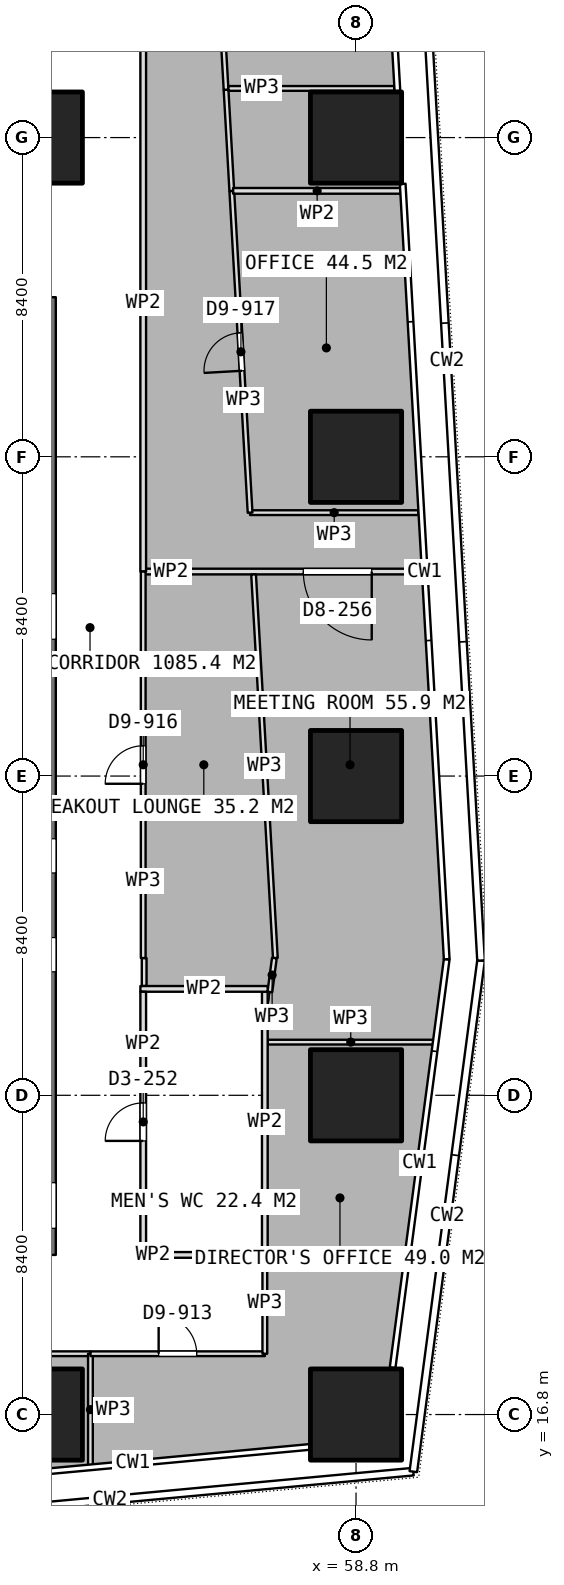
"""IFC4 building model, lengths in metres.
Left out: names, types, materials, properties, quantities, classifications, styles, units other than length and angle.
Written with IfcOpenShell. Run it as: python <this file> out.ifc"""

import sys

from ifc_helpers import new_model, si_unit, direction, frame, frame_2d, origin, origin_2d, place, context, subcontext, project, spatial, rectangle, extrude, element, fill, save


model = new_model("IFC4")
c1 = context("Model", 3, precision=1e-05, world=origin(), true_north=direction((0.0, 1.0)))
c2 = subcontext(c1, "Body", "Model", "MODEL_VIEW")
j1 = project(units=[si_unit("LENGTHUNIT", "METRE"), si_unit("PLANEANGLEUNIT", "RADIAN")], contexts=[c1])
p1 = place(None, origin())
s1 = spatial("IfcSite", under=j1, at=p1, CompositionType="ELEMENT")
p2 = place(p1, origin())
s2 = spatial("IfcBuilding", under=s1, at=p2, CompositionType="ELEMENT")
p3 = place(p2, frame((0.0, 0.0, 232.7)))
s3 = spatial("IfcBuildingStorey", under=s2, at=p3, CompositionType="ELEMENT", Elevation=232.7)
p4 = place(p3, frame((50.4, 21.0, 0.0), z_axis=(0.0, 0.0, 1.0), x_axis=(0.0, 1.0, 0.0)))
e1 = element("IfcWall", 1, at=p4, inside=s3, PredefinedType="SHEAR", context=c2, shape_type="SweptSolid", body=[
    extrude(rectangle(XDim=25.2, YDim=1.0, at=frame_2d((12.6, 0.0))), origin(), (0.0, 0.0, 1.0), 3.75),
])
p5 = place(p4, frame((16.2, 0.0, 0.0)))
e2 = element("IfcOpeningElement", 2, at=p5, cuts=e1, PredefinedType="OPENING", context=c2, shape_type="SweptSolid", body=[
    extrude(rectangle(XDim=1.2, YDim=2.1, at=frame_2d((0.6, 1.05))), frame((0.0, 0.51, 0.0), z_axis=(0.0, -1.0, 0.0), x_axis=(1.0, 0.0, 0.0)), (0.0, 0.0, 1.0), 1.02),
])
p6 = place(p4, frame((10.05, 0.0, 0.0)))
e3 = element("IfcOpeningElement", 3, at=p6, cuts=e1, PredefinedType="OPENING", context=c2, shape_type="SweptSolid", body=[
    extrude(rectangle(XDim=0.9, YDim=2.1, at=frame_2d((0.45, 1.05))), frame((0.0, 0.51, 0.0), z_axis=(0.0, -1.0, 0.0), x_axis=(1.0, 0.0, 0.0)), (0.0, 0.0, 1.0), 1.02),
])
p7 = place(p4, frame((7.45, 0.0, 0.0)))
e4 = element("IfcOpeningElement", 4, at=p7, cuts=e1, PredefinedType="OPENING", context=c2, shape_type="SweptSolid", body=[
    extrude(rectangle(XDim=0.9, YDim=2.1, at=frame_2d((0.45, 1.05))), frame((0.0, 0.51, 0.0), z_axis=(0.0, -1.0, 0.0), x_axis=(1.0, 0.0, 0.0)), (0.0, 0.0, 1.0), 1.02),
])
p8 = place(p4, frame((0.7, 0.0, 0.0)))
e5 = element("IfcOpeningElement", 5, at=p8, cuts=e1, PredefinedType="OPENING", context=c2, shape_type="SweptSolid", body=[
    extrude(rectangle(XDim=1.2, YDim=2.1, at=frame_2d((0.6, 1.05))), frame((0.0, 0.51, 0.0), z_axis=(0.0, -1.0, 0.0), x_axis=(1.0, 0.0, 0.0)), (0.0, 0.0, 1.0), 1.02),
])
for number, where, z_axis, x_axis in (
    (6, (50.4, 16.8, 0.0), (0.0, 0.0, 1.0), (1.0, 0.0, 0.0)),
    (7, (50.4, 50.4, 0.0), (0.0, 0.0, 1.0), (1.0, 0.0, 0.0)),
    (8, (58.8, 16.8, 0.0), (0.0, 0.0, 1.0), (1.0, 0.0, 0.0)),
    (9, (58.8, 25.2, 0.0), (0.0, 0.0, 1.0), (1.0, 0.0, 0.0)),
    (10, (58.8, 33.6, 0.0), (0.0, 0.0, 1.0), (1.0, 0.0, 0.0)),
    (11, (58.8, 42.0, 0.0), (0.0, 0.0, 1.0), (1.0, 0.0, 0.0)),
    (12, (58.8, 50.4, 0.0), (0.0, 0.0, 1.0), (1.0, 0.0, 0.0)),
):
    element("IfcColumn", number, at=place(p3, frame(where, z_axis=z_axis, x_axis=x_axis)), inside=s3, PredefinedType="COLUMN", context=c2, shape_type="SweptSolid", body=[
        extrude(rectangle(XDim=2.4, YDim=2.4, at=origin_2d()), origin(), (0.0, 0.0, 1.0), 3.75),
    ])
for number, where, z_axis, x_axis in (
    (13, (53.125, 21.0, 0.0), (0.0, 0.0, 1.0), (1.0, 0.0, 0.0)),
    (14, (53.125, 28.0, 0.0), (0.0, 0.0, 1.0), (1.0, 0.0, 0.0)),
):
    element("IfcWall", number, at=place(p3, frame(where, z_axis=z_axis, x_axis=x_axis)), inside=s3, PredefinedType="PARTITIONING", context=c2, shape_type="SweptSolid", body=[
        extrude(rectangle(XDim=3.35, YDim=0.15, at=frame_2d((1.675, 0.0))), origin(), (0.0, 0.0, 1.0), 3.5),
    ])
p9 = place(p3, frame((53.2, 21.075, 0.0), z_axis=(0.0, 0.0, 1.0), x_axis=(0.0, 1.0, 0.0)))
e15 = element("IfcWall", 15, at=p9, inside=s3, PredefinedType="PARTITIONING", context=c2, shape_type="SweptSolid", body=[
    extrude(rectangle(XDim=6.85, YDim=0.15, at=frame_2d((3.425, 0.0))), origin(), (0.0, 0.0, 1.0), 3.5),
])
p10 = place(p9, frame((2.925, 0.0, 0.0)))
e16 = element("IfcOpeningElement", 16, at=p10, cuts=e15, PredefinedType="OPENING", context=c2, shape_type="SweptSolid", body=[
    extrude(rectangle(XDim=1.0, YDim=2.1, at=frame_2d((0.5, 1.05))), frame((0.0, 0.085, 0.0), z_axis=(0.0, -1.0, 0.0), x_axis=(1.0, 0.0, 0.0)), (0.0, 0.0, 1.0), 0.17),
])
p11 = place(p3, frame((56.4, 21.075, 0.0), z_axis=(0.0, 0.0, 1.0), x_axis=(0.0, 1.0, 0.0)))
e17 = element("IfcWall", 17, at=p11, inside=s3, PredefinedType="PARTITIONING", context=c2, shape_type="SweptSolid", body=[
    extrude(rectangle(XDim=6.85, YDim=0.15, at=frame_2d((3.425, 0.0))), origin(), (0.0, 0.0, 1.0), 3.5),
])
p12 = place(p3, frame((23.944, 18.4, 0.0), z_axis=(0.0, 0.0, 1.0), x_axis=(1.0, 0.0, 0.0)))
e18 = element("IfcWall", 18, at=p12, inside=s3, PredefinedType="PARTITIONING", context=c2, shape_type="SweptSolid", body=[
    extrude(rectangle(XDim=27.867, YDim=0.125, at=frame_2d((13.934, 0.0))), origin(), (0.0, 0.0, 1.0), 3.5),
])
p13 = place(p12, frame((13.433, 0.0, 0.0)))
e19 = element("IfcOpeningElement", 19, at=p13, cuts=e18, PredefinedType="OPENING", context=c2, shape_type="SweptSolid", body=[
    extrude(rectangle(XDim=1.0, YDim=2.1, at=frame_2d((0.5, 1.05))), frame((0.0, 0.073, 0.0), z_axis=(0.0, -1.0, 0.0), x_axis=(1.0, 0.0, 0.0)), (0.0, 0.0, 1.0), 0.145),
])
p14 = place(p3, frame((51.811, 18.4, 0.0), z_axis=(0.0, 0.0, 1.0), x_axis=(0.0, -1.0, 0.0)))
e20 = element("IfcWall", 20, at=p14, inside=s3, PredefinedType="PARTITIONING", context=c2, shape_type="SweptSolid", body=[
    extrude(rectangle(XDim=2.94, YDim=0.125, at=frame_2d((1.47, 0.0))), origin(), (0.0, 0.0, 1.0), 3.5),
])
p15 = place(p3, frame((56.475, 26.599, 0.0), z_axis=(0.0, 0.0, 1.0), x_axis=(1.0, 0.0, 0.0)))
e21 = element("IfcWall", 21, at=p15, inside=s3, PredefinedType="PARTITIONING", context=c2, shape_type="SweptSolid", body=[
    extrude(rectangle(XDim=4.372, YDim=0.125, at=frame_2d((2.186, 0.0))), origin(), (0.0, 0.0, 1.0), 3.5),
])
p16 = place(p3, frame((51.812, 18.4, 0.0), z_axis=(0.0, 0.0, 1.0), x_axis=(1.0, 0.0, 0.0)))
e22 = element("IfcWall", 22, at=p16, inside=s3, PredefinedType="PARTITIONING", context=c2, shape_type="SweptSolid", body=[
    extrude(rectangle(XDim=4.588, YDim=0.125, at=frame_2d((2.294, 0.0))), origin(), (0.0, 0.0, 1.0), 3.5),
])
p17 = place(p16, frame((1.794, 0.0, 0.0)))
e23 = element("IfcOpeningElement", 23, at=p17, cuts=e22, PredefinedType="OPENING", context=c2, shape_type="SweptSolid", body=[
    extrude(rectangle(XDim=1.0, YDim=2.1, at=frame_2d((0.5, 1.05))), frame((0.0, 0.073, 0.0), z_axis=(0.0, -1.0, 0.0), x_axis=(1.0, 0.0, 0.0)), (0.0, 0.0, 1.0), 0.145),
])
p18 = place(p3, frame((56.4, 18.4, 0.0), z_axis=(0.0, 0.0, 1.0), x_axis=(0.0, 1.0, 0.0)))
e24 = element("IfcWall", 24, at=p18, inside=s3, PredefinedType="PARTITIONING", context=c2, shape_type="SweptSolid", body=[
    extrude(rectangle(XDim=2.675, YDim=0.125, at=frame_2d((1.337, 0.0))), origin(), (0.0, 0.0, 1.0), 3.5),
])
p19 = place(p3, frame((56.533, 27.918, 0.0), z_axis=(0.0, 0.0, 1.0), x_axis=(0.130903187638, 0.991395156064, 0.0)))
e25 = element("IfcWall", 25, at=p19, inside=s3, PredefinedType="PARTITIONING", context=c2, shape_type="SweptSolid", body=[
    extrude(rectangle(XDim=0.901, YDim=0.125, at=frame_2d((0.45, 0.0))), origin(), (0.0, 0.0, 1.0), 3.5),
])
p20 = place(p3, frame((55.441, 51.693, 0.0), z_axis=(0.0, 0.0, 1.0), x_axis=(1.0, 0.0, 0.0)))
e26 = element("IfcWall", 26, at=p20, inside=s3, PredefinedType="PARTITIONING", context=c2, shape_type="SweptSolid", body=[
    extrude(rectangle(XDim=4.365, YDim=0.125, at=frame_2d((2.183, 0.0))), origin(), (0.0, 0.0, 1.0), 3.5),
])
p21 = place(p3, frame((60.439, 40.531, 0.0), z_axis=(0.0, 0.0, 1.0), x_axis=(-1.0, 0.0, 0.0)))
e27 = element("IfcWall", 27, at=p21, inside=s3, PredefinedType="PARTITIONING", context=c2, shape_type="SweptSolid", body=[
    extrude(rectangle(XDim=4.427, YDim=0.125, at=frame_2d((2.213, 0.0))), origin(), (0.0, 0.0, 1.0), 3.5),
])
p22 = place(p3, frame((56.012, 40.531, 0.0), z_axis=(0.0, 0.0, 1.0), x_axis=(-0.056725059265, 0.998389837514, 0.0)))
e28 = element("IfcWall", 28, at=p22, inside=s3, PredefinedType="PARTITIONING", context=c2, shape_type="SweptSolid", body=[
    extrude(rectangle(XDim=8.479, YDim=0.125, at=frame_2d((4.239, 0.0))), origin(), (0.0, 0.0, 1.0), 3.5),
])
p23 = place(p22, frame((3.739, 0.0, 0.0)))
e29 = element("IfcOpeningElement", 29, at=p23, cuts=e28, PredefinedType="OPENING", context=c2, shape_type="SweptSolid", body=[
    extrude(rectangle(XDim=1.0, YDim=2.1, at=frame_2d((0.5, 1.05))), frame((0.0, 0.073, 0.0), z_axis=(0.0, -1.0, 0.0), x_axis=(1.0, 0.0, 0.0)), (0.0, 0.0, 1.0), 0.145),
])
p24 = place(p3, frame((55.531, 48.996, 0.0), z_axis=(0.0, 0.0, 1.0), x_axis=(-0.056702825143, 0.998391100532, 0.0)))
e30 = element("IfcWall", 30, at=p24, inside=s3, PredefinedType="PARTITIONING", context=c2, shape_type="SweptSolid", body=[
    extrude(rectangle(XDim=2.665, YDim=0.125, at=frame_2d((1.333, 0.0))), origin(), (0.0, 0.0, 1.0), 3.5),
])
p25 = place(p3, frame((55.38, 51.658, 0.0), z_axis=(0.0, 0.0, 1.0), x_axis=(-0.056660197754, 0.998393520607, 0.0)))
e31 = element("IfcWall", 31, at=p25, inside=s3, PredefinedType="PARTITIONING", context=c2, shape_type="SweptSolid", body=[
    extrude(rectangle(XDim=4.783, YDim=0.125, at=frame_2d((2.391, 0.0))), origin(), (0.0, 0.0, 1.0), 3.5),
])
p26 = place(p3, frame((55.566, 48.998, 0.0), z_axis=(0.0, 0.0, 1.0), x_axis=(1.0, 0.0, 0.0)))
e32 = element("IfcWall", 32, at=p26, inside=s3, PredefinedType="PARTITIONING", context=c2, shape_type="SweptSolid", body=[
    extrude(rectangle(XDim=4.422, YDim=0.15, at=frame_2d((2.211, 0.0))), origin(), (0.0, 0.0, 1.0), 3.5),
])
p27 = place(p3, frame((60.527, 38.981, 0.0), z_axis=(0.0, 0.0, 1.0), x_axis=(-1.0, 0.0, 0.0)))
e33 = element("IfcWall", 33, at=p27, inside=s3, PredefinedType="PARTITIONING", context=c2, shape_type="SweptSolid", body=[
    extrude(rectangle(XDim=7.327, YDim=0.15, at=frame_2d((3.664, 0.0))), origin(), (0.0, 0.0, 1.0), 3.5),
])
p28 = place(p27, frame((1.314, 0.0, 0.0)))
e34 = element("IfcOpeningElement", 34, at=p28, cuts=e33, PredefinedType="OPENING", context=c2, shape_type="SweptSolid", body=[
    extrude(rectangle(XDim=1.8, YDim=2.1, at=frame_2d((0.9, 1.05))), frame((0.0, 0.085, 0.0), z_axis=(0.0, -1.0, 0.0), x_axis=(1.0, 0.0, 0.0)), (0.0, 0.0, 1.0), 0.17),
])
p29 = place(p3, frame((53.2, 38.981, 0.0), z_axis=(0.0, 0.0, 1.0), x_axis=(0.0, 1.0, 0.0)))
e35 = element("IfcWall", 35, at=p29, inside=s3, PredefinedType="PARTITIONING", context=c2, shape_type="SweptSolid", body=[
    extrude(rectangle(XDim=14.119, YDim=0.15, at=frame_2d((7.06, 0.0))), origin(), (0.0, 0.0, 1.0), 3.5),
])
p30 = place(p3, frame((56.677, 28.812, 0.0), z_axis=(0.0, 0.0, 1.0), x_axis=(-0.056674993877, 0.998392680797, 0.0)))
e36 = element("IfcWall", 36, at=p30, inside=s3, PredefinedType="PARTITIONING", context=c2, shape_type="SweptSolid", body=[
    extrude(rectangle(XDim=10.11, YDim=0.125, at=frame_2d((5.055, 0.0))), origin(), (0.0, 0.0, 1.0), 3.5),
])
p31 = place(p3, frame((53.225, 28.075, 0.0), z_axis=(0.0, 0.0, 1.0), x_axis=(0.0, 1.0, 0.0)))
e37 = element("IfcWall", 37, at=p31, inside=s3, PredefinedType="PARTITIONING", context=c2, shape_type="SweptSolid", body=[
    extrude(rectangle(XDim=0.737, YDim=0.125, at=frame_2d((0.369, 0.0))), origin(), (0.0, 0.0, 1.0), 3.5),
])
p32 = place(p3, frame((53.2, 28.812, 0.0), z_axis=(0.0, 0.0, 1.0), x_axis=(0.0, 1.0, 0.0)))
e38 = element("IfcWall", 38, at=p32, inside=s3, PredefinedType="PARTITIONING", context=c2, shape_type="SweptSolid", body=[
    extrude(rectangle(XDim=10.169, YDim=0.125, at=frame_2d((5.084, 0.0))), origin(), (0.0, 0.0, 1.0), 3.5),
])
p33 = place(p32, frame((4.585, 0.0, 0.0)))
e39 = element("IfcOpeningElement", 39, at=p33, cuts=e38, PredefinedType="OPENING", context=c2, shape_type="SweptSolid", body=[
    extrude(rectangle(XDim=1.0, YDim=2.1, at=frame_2d((0.5, 1.05))), frame((0.0, 0.073, 0.0), z_axis=(0.0, -1.0, 0.0), x_axis=(1.0, 0.0, 0.0)), (0.0, 0.0, 1.0), 0.145),
])
p34 = place(p10, origin())
e40 = element("IfcDoor", 40, at=p34, inside=s3, OperationType="SINGLE_SWING_LEFT", PredefinedType="DOOR", context=c2, shape_type="SweptSolid", body=[
    extrude(rectangle(XDim=1.0, YDim=2.1, at=frame_2d((0.5, 1.05))), frame((0.0, 0.025, 0.0), z_axis=(0.0, -1.0, 0.0), x_axis=(1.0, 0.0, 0.0)), (0.0, 0.0, 1.0), 0.05),
])
fill(e16, e40)
p35 = place(p17, origin())
e41 = element("IfcDoor", 41, at=p35, inside=s3, OperationType="SINGLE_SWING_LEFT", PredefinedType="DOOR", context=c2, shape_type="SweptSolid", body=[
    extrude(rectangle(XDim=1.0, YDim=2.1, at=frame_2d((0.5, 1.05))), frame((0.0, 0.025, 0.0), z_axis=(0.0, -1.0, 0.0), x_axis=(1.0, 0.0, 0.0)), (0.0, 0.0, 1.0), 0.05),
])
fill(e23, e41)
p36 = place(p23, origin())
e42 = element("IfcDoor", 42, at=p36, inside=s3, OperationType="SINGLE_SWING_LEFT", PredefinedType="DOOR", context=c2, shape_type="SweptSolid", body=[
    extrude(rectangle(XDim=1.0, YDim=2.1, at=frame_2d((0.5, 1.05))), frame((0.0, 0.025, 0.0), z_axis=(0.0, -1.0, 0.0), x_axis=(1.0, 0.0, 0.0)), (0.0, 0.0, 1.0), 0.05),
])
fill(e29, e42)
p37 = place(p28, origin())
e43 = element("IfcDoor", 43, at=p37, inside=s3, OperationType="DOUBLE_DOOR_SINGLE_SWING", PredefinedType="DOOR", context=c2, shape_type="SweptSolid", body=[
    extrude(rectangle(XDim=1.8, YDim=2.1, at=frame_2d((0.9, 1.05))), frame((0.0, 0.025, 0.0), z_axis=(0.0, -1.0, 0.0), x_axis=(1.0, 0.0, 0.0)), (0.0, 0.0, 1.0), 0.05),
])
fill(e34, e43)
p38 = place(p33, origin())
e44 = element("IfcDoor", 44, at=p38, inside=s3, OperationType="SINGLE_SWING_LEFT", PredefinedType="DOOR", context=c2, shape_type="SweptSolid", body=[
    extrude(rectangle(XDim=1.0, YDim=2.1, at=frame_2d((0.5, 1.05))), frame((0.0, 0.025, 0.0), z_axis=(0.0, -1.0, 0.0), x_axis=(1.0, 0.0, 0.0)), (0.0, 0.0, 1.0), 0.05),
])
fill(e39, e44)
save(model, sys.argv[1])
